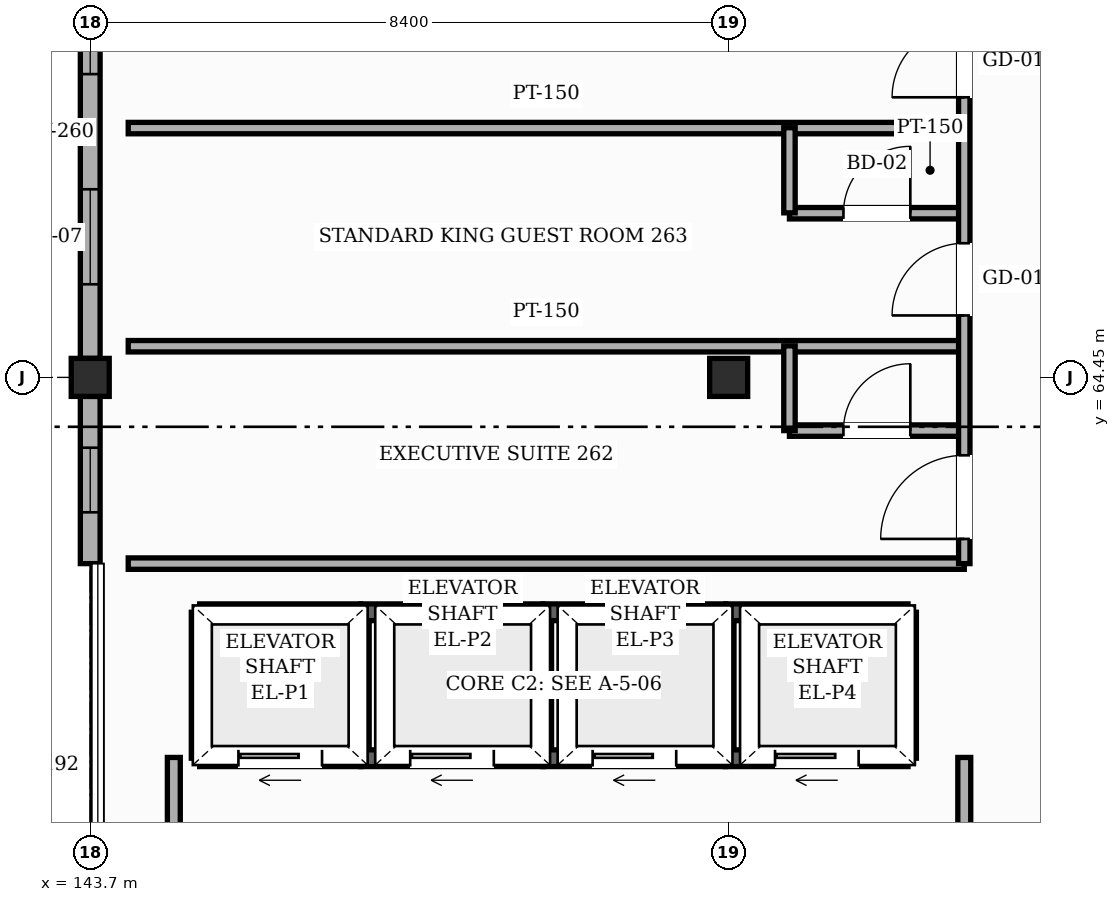
"""IFC4 building model, lengths in metres.
Left out: names, types, materials, properties, quantities, classifications, styles, units other than length and angle.
Written with IfcOpenShell. Run it as: python <this file> out.ifc"""

import sys

from ifc_helpers import new_model, si_unit, direction, frame, frame_2d, origin, origin_2d, place, context, subcontext, project, spatial, rectangle, hollow_rectangle, extrude, element, fill, save


model = new_model("IFC4")
c1 = context("Model", 3, precision=1e-05, world=origin(), true_north=direction((0.0, 1.0)))
c2 = subcontext(c1, "Body", "Model", "MODEL_VIEW")
j1 = project(units=[si_unit("LENGTHUNIT", "METRE"), si_unit("PLANEANGLEUNIT", "RADIAN")], contexts=[c1])
p1 = place(None, origin())
s1 = spatial("IfcSite", under=j1, at=p1, CompositionType="ELEMENT")
p2 = place(p1, origin())
s2 = spatial("IfcBuilding", under=s1, at=p2, CompositionType="ELEMENT")
p3 = place(p2, frame((0.0, 0.0, 39.0)))
s3 = spatial("IfcBuildingStorey", under=s2, at=p3, CompositionType="ELEMENT", Elevation=39.0)
for number, where, z_axis, x_axis in (
    (1, (143.7, 64.45, 0.0), (0.0, 0.0, 1.0), (1.0, 0.0, 0.0)),
    (2, (152.1, 64.45, 0.0), (0.0, 0.0, 1.0), (1.0, 0.0, 0.0)),
):
    element("IfcColumn", number, at=place(p3, frame(where, z_axis=z_axis, x_axis=x_axis)), inside=s3, PredefinedType="COLUMN", context=c2, shape_type="SweptSolid", body=[
        extrude(hollow_rectangle(XDim=0.5, YDim=0.5, WallThickness=0.022, InnerFilletRadius=0.022, OuterFilletRadius=0.044, at=origin_2d()), origin(), (0.0, 0.0, 1.0), 3.6),
    ])
p4 = place(p3, frame((143.7, 62.0, 0.0), z_axis=(0.0, 0.0, 1.0), x_axis=(0.0, 1.0, 0.0)))
e3 = element("IfcWall", 3, at=p4, inside=s3, PredefinedType="SOLIDWALL", context=c2, shape_type="SweptSolid", body=[
    extrude(rectangle(XDim=2.2, YDim=0.26, at=frame_2d((1.1, 0.0))), origin(), (0.0, 0.0, 1.0), 2.805),
])
p5 = place(p4, frame((0.675, 0.0, 0.85)))
e4 = element("IfcOpeningElement", 4, at=p5, cuts=e3, PredefinedType="OPENING", context=c2, shape_type="SweptSolid", body=[
    extrude(rectangle(XDim=0.85, YDim=1.35, at=frame_2d((0.425, 0.675))), frame((0.0, 0.14, 0.0), z_axis=(0.0, -1.0, 0.0), x_axis=(1.0, 0.0, 0.0)), (0.0, 0.0, 1.0), 0.28),
])
p6 = place(p3, frame((143.7, 64.7, 0.0), z_axis=(0.0, 0.0, 1.0), x_axis=(0.0, 1.0, 0.0)))
e5 = element("IfcWall", 5, at=p6, inside=s3, PredefinedType="SOLIDWALL", context=c2, shape_type="SweptSolid", body=[
    extrude(rectangle(XDim=8.4, YDim=0.26, at=frame_2d((4.2, 0.0))), origin(), (0.0, 0.0, 1.0), 2.655),
])
p7 = place(p6, frame((0.975, 0.0, 0.85)))
e6 = element("IfcOpeningElement", 6, at=p7, cuts=e5, PredefinedType="OPENING", context=c2, shape_type="SweptSolid", body=[
    extrude(rectangle(XDim=1.25, YDim=1.5, at=frame_2d((0.625, 0.75))), frame((0.0, 0.14, 0.0), z_axis=(0.0, -1.0, 0.0), x_axis=(1.0, 0.0, 0.0)), (0.0, 0.0, 1.0), 0.28),
])
p8 = place(p6, frame((3.74, 0.0, 0.85)))
e7 = element("IfcOpeningElement", 7, at=p8, cuts=e5, PredefinedType="OPENING", context=c2, shape_type="SweptSolid", body=[
    extrude(rectangle(XDim=1.45, YDim=1.5, at=frame_2d((0.725, 0.75))), frame((0.0, 0.14, 0.0), z_axis=(0.0, -1.0, 0.0), x_axis=(1.0, 0.0, 0.0)), (0.0, 0.0, 1.0), 0.28),
])
p9 = place(p6, frame((6.325, 0.0, 0.85)))
e8 = element("IfcOpeningElement", 8, at=p9, cuts=e5, PredefinedType="OPENING", context=c2, shape_type="SweptSolid", body=[
    extrude(rectangle(XDim=1.65, YDim=1.5, at=frame_2d((0.825, 0.75))), frame((0.0, 0.14, 0.0), z_axis=(0.0, -1.0, 0.0), x_axis=(1.0, 0.0, 0.0)), (0.0, 0.0, 1.0), 0.28),
])
p10 = place(p3, frame((145.14, 61.36, 0.0), z_axis=(0.0, 0.0, 1.0), x_axis=(1.0, 0.0, 0.0)))
e9 = element("IfcWall", 9, at=p10, inside=s3, PredefinedType="SHEAR", context=c2, shape_type="SweptSolid", body=[
    extrude(rectangle(XDim=2.12, YDim=0.22, at=frame_2d((1.06, 0.0))), origin(), (0.0, 0.0, 1.0), 3.38),
])
p11 = place(p3, frame((145.14, 59.44, 0.0), z_axis=(0.0, 0.0, 1.0), x_axis=(1.0, 0.0, 0.0)))
e10 = element("IfcWall", 10, at=p11, inside=s3, PredefinedType="SHEAR", context=c2, shape_type="SweptSolid", body=[
    extrude(rectangle(XDim=2.12, YDim=0.22, at=frame_2d((1.06, 0.0))), origin(), (0.0, 0.0, 1.0), 3.38),
])
p12 = place(p11, frame((0.51, 0.0, 0.0)))
e11 = element("IfcOpeningElement", 11, at=p12, cuts=e10, PredefinedType="OPENING", context=c2, shape_type="SweptSolid", body=[
    extrude(rectangle(XDim=1.1, YDim=2.2, at=frame_2d((0.55, 1.1))), frame((0.0, 0.12, 0.0), z_axis=(0.0, -1.0, 0.0), x_axis=(1.0, 0.0, 0.0)), (0.0, 0.0, 1.0), 0.24),
])
for number, where, z_axis, x_axis in (
    (12, (147.26, 59.44, 0.0), (0.0, 0.0, 1.0), (0.0, 1.0, 0.0)),
    (13, (145.14, 59.44, 0.0), (0.0, 0.0, 1.0), (0.0, 1.0, 0.0)),
):
    element("IfcWall", number, at=place(p3, frame(where, z_axis=z_axis, x_axis=x_axis)), inside=s3, PredefinedType="SHEAR", context=c2, shape_type="SweptSolid", body=[
        extrude(rectangle(XDim=1.92, YDim=0.22, at=frame_2d((0.96, 0.0))), origin(), (0.0, 0.0, 1.0), 3.38),
    ])
p13 = place(p3, frame((147.26, 61.36, 0.0), z_axis=(0.0, 0.0, 1.0), x_axis=(1.0, 0.0, 0.0)))
e14 = element("IfcWall", 14, at=p13, inside=s3, PredefinedType="SHEAR", context=c2, shape_type="SweptSolid", body=[
    extrude(rectangle(XDim=2.4, YDim=0.22, at=frame_2d((1.2, 0.0))), origin(), (0.0, 0.0, 1.0), 3.38),
])
p14 = place(p3, frame((147.26, 59.44, 0.0), z_axis=(0.0, 0.0, 1.0), x_axis=(1.0, 0.0, 0.0)))
e15 = element("IfcWall", 15, at=p14, inside=s3, PredefinedType="SHEAR", context=c2, shape_type="SweptSolid", body=[
    extrude(rectangle(XDim=2.4, YDim=0.22, at=frame_2d((1.2, 0.0))), origin(), (0.0, 0.0, 1.0), 3.38),
])
p15 = place(p14, frame((0.65, 0.0, 0.0)))
e16 = element("IfcOpeningElement", 16, at=p15, cuts=e15, PredefinedType="OPENING", context=c2, shape_type="SweptSolid", body=[
    extrude(rectangle(XDim=1.1, YDim=2.2, at=frame_2d((0.55, 1.1))), frame((0.0, 0.12, 0.0), z_axis=(0.0, -1.0, 0.0), x_axis=(1.0, 0.0, 0.0)), (0.0, 0.0, 1.0), 0.24),
])
p16 = place(p3, frame((149.66, 59.44, 0.0), z_axis=(0.0, 0.0, 1.0), x_axis=(0.0, 1.0, 0.0)))
e17 = element("IfcWall", 17, at=p16, inside=s3, PredefinedType="SHEAR", context=c2, shape_type="SweptSolid", body=[
    extrude(rectangle(XDim=1.92, YDim=0.22, at=frame_2d((0.96, 0.0))), origin(), (0.0, 0.0, 1.0), 3.38),
])
p17 = place(p3, frame((149.66, 61.36, 0.0), z_axis=(0.0, 0.0, 1.0), x_axis=(1.0, 0.0, 0.0)))
e18 = element("IfcWall", 18, at=p17, inside=s3, PredefinedType="SHEAR", context=c2, shape_type="SweptSolid", body=[
    extrude(rectangle(XDim=2.4, YDim=0.22, at=frame_2d((1.2, 0.0))), origin(), (0.0, 0.0, 1.0), 3.38),
])
p18 = place(p3, frame((149.66, 59.44, 0.0), z_axis=(0.0, 0.0, 1.0), x_axis=(1.0, 0.0, 0.0)))
e19 = element("IfcWall", 19, at=p18, inside=s3, PredefinedType="SHEAR", context=c2, shape_type="SweptSolid", body=[
    extrude(rectangle(XDim=2.4, YDim=0.22, at=frame_2d((1.2, 0.0))), origin(), (0.0, 0.0, 1.0), 3.38),
])
p19 = place(p18, frame((0.65, 0.0, 0.0)))
e20 = element("IfcOpeningElement", 20, at=p19, cuts=e19, PredefinedType="OPENING", context=c2, shape_type="SweptSolid", body=[
    extrude(rectangle(XDim=1.1, YDim=2.2, at=frame_2d((0.55, 1.1))), frame((0.0, 0.12, 0.0), z_axis=(0.0, -1.0, 0.0), x_axis=(1.0, 0.0, 0.0)), (0.0, 0.0, 1.0), 0.24),
])
p20 = place(p3, frame((152.06, 59.44, 0.0), z_axis=(0.0, 0.0, 1.0), x_axis=(0.0, 1.0, 0.0)))
e21 = element("IfcWall", 21, at=p20, inside=s3, PredefinedType="SHEAR", context=c2, shape_type="SweptSolid", body=[
    extrude(rectangle(XDim=1.92, YDim=0.22, at=frame_2d((0.96, 0.0))), origin(), (0.0, 0.0, 1.0), 3.38),
])
p21 = place(p3, frame((152.06, 61.36, 0.0), z_axis=(0.0, 0.0, 1.0), x_axis=(1.0, 0.0, 0.0)))
e22 = element("IfcWall", 22, at=p21, inside=s3, PredefinedType="SHEAR", context=c2, shape_type="SweptSolid", body=[
    extrude(rectangle(XDim=2.4, YDim=0.22, at=frame_2d((1.2, 0.0))), origin(), (0.0, 0.0, 1.0), 3.38),
])
p22 = place(p3, frame((152.06, 59.44, 0.0), z_axis=(0.0, 0.0, 1.0), x_axis=(1.0, 0.0, 0.0)))
e23 = element("IfcWall", 23, at=p22, inside=s3, PredefinedType="SHEAR", context=c2, shape_type="SweptSolid", body=[
    extrude(rectangle(XDim=2.4, YDim=0.22, at=frame_2d((1.2, 0.0))), origin(), (0.0, 0.0, 1.0), 3.38),
])
p23 = place(p22, frame((0.65, 0.0, 0.0)))
e24 = element("IfcOpeningElement", 24, at=p23, cuts=e23, PredefinedType="OPENING", context=c2, shape_type="SweptSolid", body=[
    extrude(rectangle(XDim=1.1, YDim=2.2, at=frame_2d((0.55, 1.1))), frame((0.0, 0.12, 0.0), z_axis=(0.0, -1.0, 0.0), x_axis=(1.0, 0.0, 0.0)), (0.0, 0.0, 1.0), 0.24),
])
p24 = place(p3, frame((154.46, 59.44, 0.0), z_axis=(0.0, 0.0, 1.0), x_axis=(0.0, 1.0, 0.0)))
e25 = element("IfcWall", 25, at=p24, inside=s3, PredefinedType="SHEAR", context=c2, shape_type="SweptSolid", body=[
    extrude(rectangle(XDim=1.92, YDim=0.22, at=frame_2d((0.96, 0.0))), origin(), (0.0, 0.0, 1.0), 3.38),
])
p25 = place(p3, frame((144.2, 62.0, 0.0), z_axis=(0.0, 0.0, 1.0), x_axis=(1.0, 0.0, 0.0)))
e26 = element("IfcWall", 26, at=p25, inside=s3, PredefinedType="PARTITIONING", context=c2, shape_type="SweptSolid", body=[
    extrude(rectangle(XDim=11.0, YDim=0.15, at=frame_2d((5.5, 0.0))), origin(), (0.0, 0.0, 1.0), 3.365),
])
p26 = place(p3, frame((152.9, 63.75, 0.0), z_axis=(0.0, 0.0, 1.0), x_axis=(1.0, 0.0, 0.0)))
e27 = element("IfcWall", 27, at=p26, inside=s3, PredefinedType="PARTITIONING", context=c2, shape_type="SweptSolid", body=[
    extrude(rectangle(XDim=2.3, YDim=0.15, at=frame_2d((1.15, 0.0))), origin(), (0.0, 0.0, 1.0), 3.365),
])
p27 = place(p26, frame((0.71, 0.0, 0.0)))
e28 = element("IfcOpeningElement", 28, at=p27, cuts=e27, PredefinedType="OPENING", context=c2, shape_type="SweptSolid", body=[
    extrude(rectangle(XDim=0.88, YDim=2.12, at=frame_2d((0.44, 1.06))), frame((0.0, 0.085, 0.0), z_axis=(0.0, -1.0, 0.0), x_axis=(1.0, 0.0, 0.0)), (0.0, 0.0, 1.0), 0.17),
])
p28 = place(p3, frame((144.2, 64.86, 0.0), z_axis=(0.0, 0.0, 1.0), x_axis=(1.0, 0.0, 0.0)))
e29 = element("IfcWall", 29, at=p28, inside=s3, PredefinedType="PARTITIONING", context=c2, shape_type="SweptSolid", body=[
    extrude(rectangle(XDim=11.0, YDim=0.15, at=frame_2d((5.5, 0.0))), origin(), (0.0, 0.0, 1.0), 3.365),
])
p29 = place(p3, frame((152.9, 66.61, 0.0), z_axis=(0.0, 0.0, 1.0), x_axis=(1.0, 0.0, 0.0)))
e30 = element("IfcWall", 30, at=p29, inside=s3, PredefinedType="PARTITIONING", context=c2, shape_type="SweptSolid", body=[
    extrude(rectangle(XDim=2.3, YDim=0.15, at=frame_2d((1.15, 0.0))), origin(), (0.0, 0.0, 1.0), 3.365),
])
p30 = place(p29, frame((0.71, 0.0, 0.0)))
e31 = element("IfcOpeningElement", 31, at=p30, cuts=e30, PredefinedType="OPENING", context=c2, shape_type="SweptSolid", body=[
    extrude(rectangle(XDim=0.88, YDim=2.12, at=frame_2d((0.44, 1.06))), frame((0.0, 0.085, 0.0), z_axis=(0.0, -1.0, 0.0), x_axis=(1.0, 0.0, 0.0)), (0.0, 0.0, 1.0), 0.17),
])
p31 = place(p3, frame((144.2, 67.73, 0.0), z_axis=(0.0, 0.0, 1.0), x_axis=(1.0, 0.0, 0.0)))
e32 = element("IfcWall", 32, at=p31, inside=s3, PredefinedType="PARTITIONING", context=c2, shape_type="SweptSolid", body=[
    extrude(rectangle(XDim=11.0, YDim=0.15, at=frame_2d((5.5, 0.0))), origin(), (0.0, 0.0, 1.0), 3.365),
])
p32 = place(p3, frame((144.8, 53.0, 0.0), z_axis=(0.0, 0.0, 1.0), x_axis=(0.0, 1.0, 0.0)))
e33 = element("IfcWall", 33, at=p32, inside=s3, PredefinedType="PARTITIONING", context=c2, shape_type="SweptSolid", body=[
    extrude(rectangle(XDim=6.45, YDim=0.17, at=frame_2d((3.225, 0.0))), origin(), (0.0, 0.0, 1.0), 3.365),
])
p33 = place(p3, frame((152.9, 63.75, 0.0), z_axis=(0.0, 0.0, 1.0), x_axis=(0.0, 1.0, 0.0)))
e34 = element("IfcWall", 34, at=p33, inside=s3, PredefinedType="PARTITIONING", context=c2, shape_type="SweptSolid", body=[
    extrude(rectangle(XDim=1.115, YDim=0.15, at=frame_2d((0.558, 0.0))), origin(), (0.0, 0.0, 1.0), 3.365),
])
p34 = place(p3, frame((152.9, 66.615, 0.0), z_axis=(0.0, 0.0, 1.0), x_axis=(0.0, 1.0, 0.0)))
e35 = element("IfcWall", 35, at=p34, inside=s3, PredefinedType="PARTITIONING", context=c2, shape_type="SweptSolid", body=[
    extrude(rectangle(XDim=1.12, YDim=0.15, at=frame_2d((0.56, 0.0))), origin(), (0.0, 0.0, 1.0), 3.365),
])
p35 = place(p3, frame((155.2, 53.0, 0.0), z_axis=(0.0, 0.0, 1.0), x_axis=(0.0, 1.0, 0.0)))
e36 = element("IfcWall", 36, at=p35, inside=s3, PredefinedType="PARTITIONING", context=c2, shape_type="SweptSolid", body=[
    extrude(rectangle(XDim=6.45, YDim=0.17, at=frame_2d((3.225, 0.0))), origin(), (0.0, 0.0, 1.0), 3.365),
])
p36 = place(p35, frame((2.625, 0.0, 0.0)))
e37 = element("IfcOpeningElement", 37, at=p36, cuts=e36, PredefinedType="OPENING", context=c2, shape_type="SweptSolid", body=[
    extrude(rectangle(XDim=1.2, YDim=2.2, at=frame_2d((0.6, 1.1))), frame((0.0, 0.095, 0.0), z_axis=(0.0, -1.0, 0.0), x_axis=(1.0, 0.0, 0.0)), (0.0, 0.0, 1.0), 0.19),
])
p37 = place(p3, frame((155.2, 62.0, 0.0), z_axis=(0.0, 0.0, 1.0), x_axis=(0.0, 1.0, 0.0)))
e38 = element("IfcWall", 38, at=p37, inside=s3, PredefinedType="PARTITIONING", context=c2, shape_type="SweptSolid", body=[
    extrude(rectangle(XDim=34.4, YDim=0.15, at=frame_2d((17.2, 0.0))), origin(), (0.0, 0.0, 1.0), 3.365),
])
p38 = place(p37, frame((0.325, 0.0, 0.0)))
e39 = element("IfcOpeningElement", 39, at=p38, cuts=e38, PredefinedType="OPENING", context=c2, shape_type="SweptSolid", body=[
    extrude(rectangle(XDim=1.1, YDim=2.2, at=frame_2d((0.55, 1.1))), frame((0.0, 0.085, 0.0), z_axis=(0.0, -1.0, 0.0), x_axis=(1.0, 0.0, 0.0)), (0.0, 0.0, 1.0), 0.17),
])
p39 = place(p37, frame((3.265, 0.0, 0.0)))
e40 = element("IfcOpeningElement", 40, at=p39, cuts=e38, PredefinedType="OPENING", context=c2, shape_type="SweptSolid", body=[
    extrude(rectangle(XDim=0.95, YDim=2.15, at=frame_2d((0.475, 1.075))), frame((0.0, 0.085, 0.0), z_axis=(0.0, -1.0, 0.0), x_axis=(1.0, 0.0, 0.0)), (0.0, 0.0, 1.0), 0.17),
])
p40 = place(p37, frame((6.135, 0.0, 0.0)))
e41 = element("IfcOpeningElement", 41, at=p40, cuts=e38, PredefinedType="OPENING", context=c2, shape_type="SweptSolid", body=[
    extrude(rectangle(XDim=0.95, YDim=2.15, at=frame_2d((0.475, 1.075))), frame((0.0, 0.085, 0.0), z_axis=(0.0, -1.0, 0.0), x_axis=(1.0, 0.0, 0.0)), (0.0, 0.0, 1.0), 0.17),
])
p41 = place(p37, frame((9.0, 0.0, 0.0)))
e42 = element("IfcOpeningElement", 42, at=p41, cuts=e38, PredefinedType="OPENING", context=c2, shape_type="SweptSolid", body=[
    extrude(rectangle(XDim=0.95, YDim=2.15, at=frame_2d((0.475, 1.075))), frame((0.0, 0.085, 0.0), z_axis=(0.0, -1.0, 0.0), x_axis=(1.0, 0.0, 0.0)), (0.0, 0.0, 1.0), 0.17),
])
p42 = place(p37, frame((11.865, 0.0, 0.0)))
e43 = element("IfcOpeningElement", 43, at=p42, cuts=e38, PredefinedType="OPENING", context=c2, shape_type="SweptSolid", body=[
    extrude(rectangle(XDim=0.95, YDim=2.15, at=frame_2d((0.475, 1.075))), frame((0.0, 0.085, 0.0), z_axis=(0.0, -1.0, 0.0), x_axis=(1.0, 0.0, 0.0)), (0.0, 0.0, 1.0), 0.17),
])
p43 = place(p37, frame((14.735, 0.0, 0.0)))
e44 = element("IfcOpeningElement", 44, at=p43, cuts=e38, PredefinedType="OPENING", context=c2, shape_type="SweptSolid", body=[
    extrude(rectangle(XDim=0.95, YDim=2.15, at=frame_2d((0.475, 1.075))), frame((0.0, 0.085, 0.0), z_axis=(0.0, -1.0, 0.0), x_axis=(1.0, 0.0, 0.0)), (0.0, 0.0, 1.0), 0.17),
])
p44 = place(p37, frame((17.6, 0.0, 0.0)))
e45 = element("IfcOpeningElement", 45, at=p44, cuts=e38, PredefinedType="OPENING", context=c2, shape_type="SweptSolid", body=[
    extrude(rectangle(XDim=0.95, YDim=2.15, at=frame_2d((0.475, 1.075))), frame((0.0, 0.085, 0.0), z_axis=(0.0, -1.0, 0.0), x_axis=(1.0, 0.0, 0.0)), (0.0, 0.0, 1.0), 0.17),
])
p45 = place(p37, frame((20.465, 0.0, 0.0)))
e46 = element("IfcOpeningElement", 46, at=p45, cuts=e38, PredefinedType="OPENING", context=c2, shape_type="SweptSolid", body=[
    extrude(rectangle(XDim=0.95, YDim=2.15, at=frame_2d((0.475, 1.075))), frame((0.0, 0.085, 0.0), z_axis=(0.0, -1.0, 0.0), x_axis=(1.0, 0.0, 0.0)), (0.0, 0.0, 1.0), 0.17),
])
p46 = place(p37, frame((23.335, 0.0, 0.0)))
e47 = element("IfcOpeningElement", 47, at=p46, cuts=e38, PredefinedType="OPENING", context=c2, shape_type="SweptSolid", body=[
    extrude(rectangle(XDim=0.95, YDim=2.15, at=frame_2d((0.475, 1.075))), frame((0.0, 0.085, 0.0), z_axis=(0.0, -1.0, 0.0), x_axis=(1.0, 0.0, 0.0)), (0.0, 0.0, 1.0), 0.17),
])
p47 = place(p37, frame((26.2, 0.0, 0.0)))
e48 = element("IfcOpeningElement", 48, at=p47, cuts=e38, PredefinedType="OPENING", context=c2, shape_type="SweptSolid", body=[
    extrude(rectangle(XDim=0.95, YDim=2.15, at=frame_2d((0.475, 1.075))), frame((0.0, 0.085, 0.0), z_axis=(0.0, -1.0, 0.0), x_axis=(1.0, 0.0, 0.0)), (0.0, 0.0, 1.0), 0.17),
])
p48 = place(p37, frame((29.065, 0.0, 0.0)))
e49 = element("IfcOpeningElement", 49, at=p48, cuts=e38, PredefinedType="OPENING", context=c2, shape_type="SweptSolid", body=[
    extrude(rectangle(XDim=0.95, YDim=2.15, at=frame_2d((0.475, 1.075))), frame((0.0, 0.085, 0.0), z_axis=(0.0, -1.0, 0.0), x_axis=(1.0, 0.0, 0.0)), (0.0, 0.0, 1.0), 0.17),
])
p49 = place(p37, frame((31.935, 0.0, 0.0)))
e50 = element("IfcOpeningElement", 50, at=p49, cuts=e38, PredefinedType="OPENING", context=c2, shape_type="SweptSolid", body=[
    extrude(rectangle(XDim=0.95, YDim=2.15, at=frame_2d((0.475, 1.075))), frame((0.0, 0.085, 0.0), z_axis=(0.0, -1.0, 0.0), x_axis=(1.0, 0.0, 0.0)), (0.0, 0.0, 1.0), 0.17),
])
p50 = place(p5, origin())
e51 = element("IfcWindow", 51, at=p50, inside=s3, PartitioningType="SINGLE_PANEL", PredefinedType="WINDOW", context=c2, shape_type="SweptSolid", body=[
    extrude(rectangle(XDim=0.85, YDim=1.35, at=frame_2d((0.425, 0.675))), frame((0.0, 0.03, 0.0), z_axis=(0.0, -1.0, 0.0), x_axis=(1.0, 0.0, 0.0)), (0.0, 0.0, 1.0), 0.06),
])
fill(e4, e51)
p51 = place(p7, origin())
e52 = element("IfcWindow", 52, at=p51, inside=s3, PartitioningType="SINGLE_PANEL", PredefinedType="WINDOW", context=c2, shape_type="SweptSolid", body=[
    extrude(rectangle(XDim=1.25, YDim=1.5, at=frame_2d((0.625, 0.75))), frame((0.0, 0.03, 0.0), z_axis=(0.0, -1.0, 0.0), x_axis=(1.0, 0.0, 0.0)), (0.0, 0.0, 1.0), 0.06),
])
fill(e6, e52)
p52 = place(p8, origin())
e53 = element("IfcWindow", 53, at=p52, inside=s3, PartitioningType="SINGLE_PANEL", PredefinedType="WINDOW", context=c2, shape_type="SweptSolid", body=[
    extrude(rectangle(XDim=1.45, YDim=1.5, at=frame_2d((0.725, 0.75))), frame((0.0, 0.03, 0.0), z_axis=(0.0, -1.0, 0.0), x_axis=(1.0, 0.0, 0.0)), (0.0, 0.0, 1.0), 0.06),
])
fill(e7, e53)
p53 = place(p12, origin())
e54 = element("IfcDoor", 54, at=p53, inside=s3, OperationType="SLIDING_TO_LEFT", PredefinedType="DOOR", context=c2, shape_type="SweptSolid", body=[
    extrude(rectangle(XDim=1.1, YDim=2.2, at=frame_2d((0.55, 1.1))), frame((0.0, 0.025, 0.0), z_axis=(0.0, -1.0, 0.0), x_axis=(1.0, 0.0, 0.0)), (0.0, 0.0, 1.0), 0.05),
])
fill(e11, e54)
p54 = place(p15, origin())
e55 = element("IfcDoor", 55, at=p54, inside=s3, OperationType="SLIDING_TO_LEFT", PredefinedType="DOOR", context=c2, shape_type="SweptSolid", body=[
    extrude(rectangle(XDim=1.1, YDim=2.2, at=frame_2d((0.55, 1.1))), frame((0.0, 0.025, 0.0), z_axis=(0.0, -1.0, 0.0), x_axis=(1.0, 0.0, 0.0)), (0.0, 0.0, 1.0), 0.05),
])
fill(e16, e55)
p55 = place(p19, origin())
e56 = element("IfcDoor", 56, at=p55, inside=s3, OperationType="SLIDING_TO_LEFT", PredefinedType="DOOR", context=c2, shape_type="SweptSolid", body=[
    extrude(rectangle(XDim=1.1, YDim=2.2, at=frame_2d((0.55, 1.1))), frame((0.0, 0.025, 0.0), z_axis=(0.0, -1.0, 0.0), x_axis=(1.0, 0.0, 0.0)), (0.0, 0.0, 1.0), 0.05),
])
fill(e20, e56)
p56 = place(p23, origin())
e57 = element("IfcDoor", 57, at=p56, inside=s3, OperationType="SLIDING_TO_LEFT", PredefinedType="DOOR", context=c2, shape_type="SweptSolid", body=[
    extrude(rectangle(XDim=1.1, YDim=2.2, at=frame_2d((0.55, 1.1))), frame((0.0, 0.025, 0.0), z_axis=(0.0, -1.0, 0.0), x_axis=(1.0, 0.0, 0.0)), (0.0, 0.0, 1.0), 0.05),
])
fill(e24, e57)
p57 = place(p38, origin())
e58 = element("IfcDoor", 58, at=p57, inside=s3, OperationType="SINGLE_SWING_LEFT", PredefinedType="DOOR", context=c2, shape_type="SweptSolid", body=[
    extrude(rectangle(XDim=1.1, YDim=2.2, at=frame_2d((0.55, 1.1))), frame((0.0, 0.025, 0.0), z_axis=(0.0, -1.0, 0.0), x_axis=(1.0, 0.0, 0.0)), (0.0, 0.0, 1.0), 0.05),
])
fill(e39, e58)
p58 = place(p27, origin())
e59 = element("IfcDoor", 59, at=p58, inside=s3, OperationType="SINGLE_SWING_RIGHT", PredefinedType="DOOR", context=c2, shape_type="SweptSolid", body=[
    extrude(rectangle(XDim=0.88, YDim=2.12, at=frame_2d((0.44, 1.06))), frame((0.0, 0.025, 0.0), z_axis=(0.0, -1.0, 0.0), x_axis=(1.0, 0.0, 0.0)), (0.0, 0.0, 1.0), 0.05),
])
fill(e28, e59)
p59 = place(p39, origin())
e60 = element("IfcDoor", 60, at=p59, inside=s3, OperationType="SINGLE_SWING_LEFT", PredefinedType="DOOR", context=c2, shape_type="SweptSolid", body=[
    extrude(rectangle(XDim=0.95, YDim=2.15, at=frame_2d((0.475, 1.075))), frame((0.0, 0.025, 0.0), z_axis=(0.0, -1.0, 0.0), x_axis=(1.0, 0.0, 0.0)), (0.0, 0.0, 1.0), 0.05),
])
fill(e40, e60)
p60 = place(p30, origin())
e61 = element("IfcDoor", 61, at=p60, inside=s3, OperationType="SINGLE_SWING_RIGHT", PredefinedType="DOOR", context=c2, shape_type="SweptSolid", body=[
    extrude(rectangle(XDim=0.88, YDim=2.12, at=frame_2d((0.44, 1.06))), frame((0.0, 0.025, 0.0), z_axis=(0.0, -1.0, 0.0), x_axis=(1.0, 0.0, 0.0)), (0.0, 0.0, 1.0), 0.05),
])
fill(e31, e61)
p61 = place(p40, origin())
e62 = element("IfcDoor", 62, at=p61, inside=s3, OperationType="SINGLE_SWING_LEFT", PredefinedType="DOOR", context=c2, shape_type="SweptSolid", body=[
    extrude(rectangle(XDim=0.95, YDim=2.15, at=frame_2d((0.475, 1.075))), frame((0.0, 0.025, 0.0), z_axis=(0.0, -1.0, 0.0), x_axis=(1.0, 0.0, 0.0)), (0.0, 0.0, 1.0), 0.05),
])
fill(e41, e62)
save(model, sys.argv[1])
